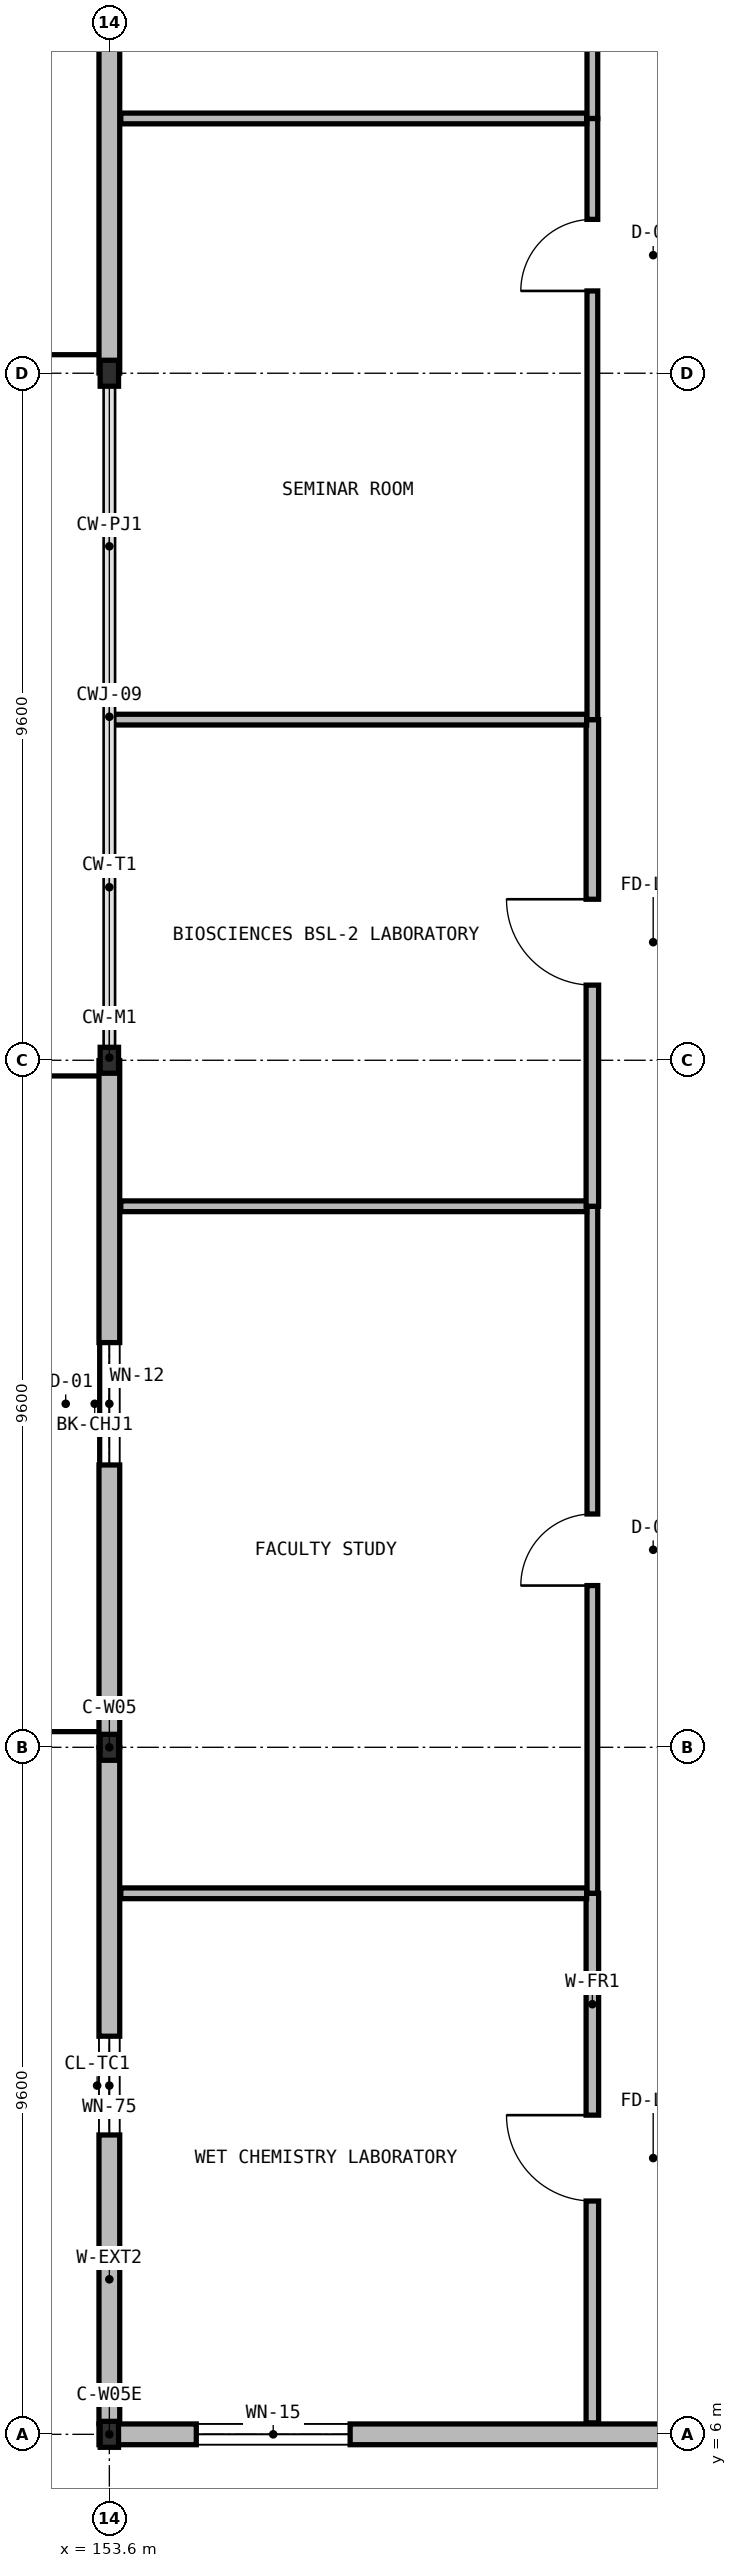
"""IFC4 building model, lengths in metres.
Left out: names, types, materials, properties, quantities, classifications, styles, units other than length and angle.
Written with IfcOpenShell. Run it as: python <this file> out.ifc"""

import sys

from ifc_helpers import new_model, si_unit, direction, frame, frame_2d, origin, origin_2d, place, context, subcontext, project, spatial, rectangle, i_section, extrude, element, fill, save


model = new_model("IFC4")
c1 = context("Model", 3, precision=1e-05, world=origin(), true_north=direction((0.0, 1.0)))
c2 = subcontext(c1, "Body", "Model", "MODEL_VIEW")
j1 = project(units=[si_unit("LENGTHUNIT", "METRE"), si_unit("PLANEANGLEUNIT", "RADIAN")], contexts=[c1])
p1 = place(None, origin())
s1 = spatial("IfcSite", under=j1, at=p1, CompositionType="ELEMENT")
p2 = place(p1, origin())
s2 = spatial("IfcBuilding", under=s1, at=p2, CompositionType="ELEMENT")
p3 = place(p2, frame((0.0, 0.0, 32.55)))
s3 = spatial("IfcBuildingStorey", under=s2, at=p3, CompositionType="ELEMENT", Elevation=32.55)
for number, where, z_axis, x_axis in (
    (1, (153.6, 6.0, 0.0), (0.0, 0.0, 1.0), (1.0, 0.0, 0.0)),
    (2, (153.6, 15.6, 0.0), (0.0, 0.0, 1.0), (1.0, 0.0, 0.0)),
    (3, (153.6, 25.2, 0.0), (0.0, 0.0, 1.0), (1.0, 0.0, 0.0)),
    (4, (153.6, 34.8, 0.0), (0.0, 0.0, 1.0), (1.0, 0.0, 0.0)),
):
    element("IfcColumn", number, at=place(p3, frame(where, z_axis=z_axis, x_axis=x_axis)), inside=s3, PredefinedType="COLUMN", context=c2, shape_type="SweptSolid", body=[
        extrude(i_section(OverallWidth=0.257, OverallDepth=0.363, WebThickness=0.013, FlangeThickness=0.022, at=origin_2d()), origin(), (0.0, 0.0, 1.0), 4.55),
    ])
p4 = place(p3, frame((153.6, 6.149, 0.0), z_axis=(0.0, 0.0, 1.0), x_axis=(0.0, 1.0, 0.0)))
e5 = element("IfcWall", 5, at=p4, inside=s3, PredefinedType="SOLIDWALL", context=c2, shape_type="SweptSolid", body=[
    extrude(rectangle(XDim=9.447, YDim=0.29, at=frame_2d((4.724, 0.0))), origin(), (0.0, 0.0, 1.0), 3.909),
])
p5 = place(p4, frame((4.034, 0.0, 0.95)))
e6 = element("IfcOpeningElement", 6, at=p5, cuts=e5, PredefinedType="OPENING", context=c2, shape_type="SweptSolid", body=[
    extrude(rectangle(XDim=1.38, YDim=1.56, at=frame_2d((0.69, 0.78))), frame((0.0, 0.155, 0.0), z_axis=(0.0, -1.0, 0.0), x_axis=(1.0, 0.0, 0.0)), (0.0, 0.0, 1.0), 0.31),
])
p6 = place(p3, frame((153.6, 15.604, 0.0), z_axis=(0.0, 0.0, 1.0), x_axis=(0.0, 1.0, 0.0)))
e7 = element("IfcWall", 7, at=p6, inside=s3, PredefinedType="SOLIDWALL", context=c2, shape_type="SweptSolid", body=[
    extrude(rectangle(XDim=9.592, YDim=0.29, at=frame_2d((4.796, 0.0))), origin(), (0.0, 0.0, 1.0), 3.909),
])
p7 = place(p6, frame((3.941, 0.0, 0.95)))
e8 = element("IfcOpeningElement", 8, at=p7, cuts=e7, PredefinedType="OPENING", context=c2, shape_type="SweptSolid", body=[
    extrude(rectangle(XDim=1.71, YDim=1.48, at=frame_2d((0.855, 0.74))), frame((0.0, 0.155, 0.0), z_axis=(0.0, -1.0, 0.0), x_axis=(1.0, 0.0, 0.0)), (0.0, 0.0, 1.0), 0.31),
])
p8 = place(p3, frame((153.6, 34.804, 0.0), z_axis=(0.0, 0.0, 1.0), x_axis=(0.0, 1.0, 0.0)))
e9 = element("IfcWall", 9, at=p8, inside=s3, PredefinedType="SOLIDWALL", context=c2, shape_type="SweptSolid", body=[
    extrude(rectangle(XDim=9.592, YDim=0.29, at=frame_2d((4.796, 0.0))), origin(), (0.0, 0.0, 1.0), 3.909),
])
p9 = place(p3, frame((163.196, 6.0, 0.0), z_axis=(0.0, 0.0, 1.0), x_axis=(-1.0, 0.0, 0.0)))
e10 = element("IfcWall", 10, at=p9, inside=s3, PredefinedType="SOLIDWALL", context=c2, shape_type="SweptSolid", body=[
    extrude(rectangle(XDim=9.741, YDim=0.29, at=frame_2d((4.871, 0.0))), origin(), (0.0, 0.0, 1.0), 3.899),
])
p10 = place(p9, frame((6.231, 0.0, 0.95)))
e11 = element("IfcOpeningElement", 11, at=p10, cuts=e10, PredefinedType="OPENING", context=c2, shape_type="SweptSolid", body=[
    extrude(rectangle(XDim=2.15, YDim=1.48, at=frame_2d((1.075, 0.74))), frame((0.0, 0.155, 0.0), z_axis=(0.0, -1.0, 0.0), x_axis=(1.0, 0.0, 0.0)), (0.0, 0.0, 1.0), 0.31),
])
p11 = place(p3, frame((160.35, 6.16, 0.0), z_axis=(0.0, 0.0, 1.0), x_axis=(0.0, 1.0, 0.0)))
e12 = element("IfcWall", 12, at=p11, inside=s3, PredefinedType="PARTITIONING", context=c2, shape_type="SweptSolid", body=[
    extrude(rectangle(XDim=7.4, YDim=0.175, at=frame_2d((3.7, 0.0))), origin(), (0.0, 0.0, 1.0), 4.3),
])
p12 = place(p11, frame((3.1, 0.0, 0.0)))
e13 = element("IfcOpeningElement", 13, at=p12, cuts=e12, PredefinedType="OPENING", context=c2, shape_type="SweptSolid", body=[
    extrude(rectangle(XDim=1.2, YDim=2.2, at=frame_2d((0.6, 1.1))), frame((0.0, 0.097, 0.0), z_axis=(0.0, -1.0, 0.0), x_axis=(1.0, 0.0, 0.0)), (0.0, 0.0, 1.0), 0.195),
])
p13 = place(p3, frame((153.76, 13.56, 0.0), z_axis=(0.0, 0.0, 1.0), x_axis=(1.0, 0.0, 0.0)))
e14 = element("IfcWall", 14, at=p13, inside=s3, PredefinedType="PARTITIONING", context=c2, shape_type="SweptSolid", body=[
    extrude(rectangle(XDim=6.51, YDim=0.15, at=frame_2d((3.255, 0.0))), origin(), (0.0, 0.0, 1.0), 4.3),
])
p14 = place(p3, frame((160.35, 13.56, 0.0), z_axis=(0.0, 0.0, 1.0), x_axis=(0.0, 1.0, 0.0)))
e15 = element("IfcWall", 15, at=p14, inside=s3, PredefinedType="PARTITIONING", context=c2, shape_type="SweptSolid", body=[
    extrude(rectangle(XDim=9.6, YDim=0.15, at=frame_2d((4.8, 0.0))), origin(), (0.0, 0.0, 1.0), 4.3),
])
p15 = place(p14, frame((4.3, 0.0, 0.0)))
e16 = element("IfcOpeningElement", 16, at=p15, cuts=e15, PredefinedType="OPENING", context=c2, shape_type="SweptSolid", body=[
    extrude(rectangle(XDim=1.0, YDim=2.2, at=frame_2d((0.5, 1.1))), frame((0.0, 0.085, 0.0), z_axis=(0.0, -1.0, 0.0), x_axis=(1.0, 0.0, 0.0)), (0.0, 0.0, 1.0), 0.17),
])
p16 = place(p3, frame((153.76, 23.16, 0.0), z_axis=(0.0, 0.0, 1.0), x_axis=(1.0, 0.0, 0.0)))
e17 = element("IfcWall", 17, at=p16, inside=s3, PredefinedType="PARTITIONING", context=c2, shape_type="SweptSolid", body=[
    extrude(rectangle(XDim=6.51, YDim=0.15, at=frame_2d((3.255, 0.0))), origin(), (0.0, 0.0, 1.0), 4.3),
])
p17 = place(p3, frame((160.35, 23.16, 0.0), z_axis=(0.0, 0.0, 1.0), x_axis=(0.0, 1.0, 0.0)))
e18 = element("IfcWall", 18, at=p17, inside=s3, PredefinedType="PARTITIONING", context=c2, shape_type="SweptSolid", body=[
    extrude(rectangle(XDim=6.8, YDim=0.175, at=frame_2d((3.4, 0.0))), origin(), (0.0, 0.0, 1.0), 4.3),
])
p18 = place(p17, frame((3.09, 0.0, 0.0)))
e19 = element("IfcOpeningElement", 19, at=p18, cuts=e18, PredefinedType="OPENING", context=c2, shape_type="SweptSolid", body=[
    extrude(rectangle(XDim=1.2, YDim=2.2, at=frame_2d((0.6, 1.1))), frame((0.0, 0.097, 0.0), z_axis=(0.0, -1.0, 0.0), x_axis=(1.0, 0.0, 0.0)), (0.0, 0.0, 1.0), 0.195),
])
p19 = place(p3, frame((153.66, 29.96, 0.0), z_axis=(0.0, 0.0, 1.0), x_axis=(1.0, 0.0, 0.0)))
e20 = element("IfcWall", 20, at=p19, inside=s3, PredefinedType="PARTITIONING", context=c2, shape_type="SweptSolid", body=[
    extrude(rectangle(XDim=6.61, YDim=0.15, at=frame_2d((3.305, 0.0))), origin(), (0.0, 0.0, 1.0), 4.3),
])
p20 = place(p3, frame((160.35, 29.96, 0.0), z_axis=(0.0, 0.0, 1.0), x_axis=(0.0, 1.0, 0.0)))
e21 = element("IfcWall", 21, at=p20, inside=s3, PredefinedType="PARTITIONING", context=c2, shape_type="SweptSolid", body=[
    extrude(rectangle(XDim=8.4, YDim=0.15, at=frame_2d((4.2, 0.0))), origin(), (0.0, 0.0, 1.0), 4.3),
])
p21 = place(p20, frame((5.99, 0.0, 0.0)))
e22 = element("IfcOpeningElement", 22, at=p21, cuts=e21, PredefinedType="OPENING", context=c2, shape_type="SweptSolid", body=[
    extrude(rectangle(XDim=1.0, YDim=2.2, at=frame_2d((0.5, 1.1))), frame((0.0, 0.085, 0.0), z_axis=(0.0, -1.0, 0.0), x_axis=(1.0, 0.0, 0.0)), (0.0, 0.0, 1.0), 0.17),
])
p22 = place(p3, frame((153.76, 38.36, 0.0), z_axis=(0.0, 0.0, 1.0), x_axis=(1.0, 0.0, 0.0)))
e23 = element("IfcWall", 23, at=p22, inside=s3, PredefinedType="PARTITIONING", context=c2, shape_type="SweptSolid", body=[
    extrude(rectangle(XDim=6.51, YDim=0.15, at=frame_2d((3.255, 0.0))), origin(), (0.0, 0.0, 1.0), 4.3),
])
p23 = place(p3, frame((160.35, 38.36, 0.0), z_axis=(0.0, 0.0, 1.0), x_axis=(0.0, 1.0, 0.0)))
e24 = element("IfcWall", 24, at=p23, inside=s3, PredefinedType="PARTITIONING", context=c2, shape_type="SweptSolid", body=[
    extrude(rectangle(XDim=7.4, YDim=0.15, at=frame_2d((3.7, 0.0))), origin(), (0.0, 0.0, 1.0), 4.3),
])
p24 = place(p23, frame((3.2, 0.0, 0.0)))
e25 = element("IfcOpeningElement", 25, at=p24, cuts=e24, PredefinedType="OPENING", context=c2, shape_type="SweptSolid", body=[
    extrude(rectangle(XDim=1.0, YDim=2.2, at=frame_2d((0.5, 1.1))), frame((0.0, 0.085, 0.0), z_axis=(0.0, -1.0, 0.0), x_axis=(1.0, 0.0, 0.0)), (0.0, 0.0, 1.0), 0.17),
])
p25 = place(p5, origin())
e26 = element("IfcWindow", 26, at=p25, inside=s3, PartitioningType="SINGLE_PANEL", PredefinedType="WINDOW", context=c2, shape_type="SweptSolid", body=[
    extrude(rectangle(XDim=1.38, YDim=1.56, at=frame_2d((0.69, 0.78))), frame((0.0, 0.03, 0.0), z_axis=(0.0, -1.0, 0.0), x_axis=(1.0, 0.0, 0.0)), (0.0, 0.0, 1.0), 0.06),
])
fill(e6, e26)
p26 = place(p7, origin())
e27 = element("IfcWindow", 27, at=p26, inside=s3, PartitioningType="SINGLE_PANEL", PredefinedType="WINDOW", context=c2, shape_type="SweptSolid", body=[
    extrude(rectangle(XDim=1.71, YDim=1.48, at=frame_2d((0.855, 0.74))), frame((0.0, 0.03, 0.0), z_axis=(0.0, -1.0, 0.0), x_axis=(1.0, 0.0, 0.0)), (0.0, 0.0, 1.0), 0.06),
])
fill(e8, e27)
p27 = place(p10, origin())
e28 = element("IfcWindow", 28, at=p27, inside=s3, PartitioningType="SINGLE_PANEL", PredefinedType="WINDOW", context=c2, shape_type="SweptSolid", body=[
    extrude(rectangle(XDim=2.15, YDim=1.48, at=frame_2d((1.075, 0.74))), frame((0.0, 0.03, 0.0), z_axis=(0.0, -1.0, 0.0), x_axis=(1.0, 0.0, 0.0)), (0.0, 0.0, 1.0), 0.06),
])
fill(e11, e28)
p28 = place(p12, origin())
e29 = element("IfcDoor", 29, at=p28, inside=s3, OperationType="SINGLE_SWING_RIGHT", PredefinedType="DOOR", context=c2, shape_type="SweptSolid", body=[
    extrude(rectangle(XDim=1.2, YDim=2.2, at=frame_2d((0.6, 1.1))), frame((0.0, 0.025, 0.0), z_axis=(0.0, -1.0, 0.0), x_axis=(1.0, 0.0, 0.0)), (0.0, 0.0, 1.0), 0.05),
])
fill(e13, e29)
p29 = place(p15, origin())
e30 = element("IfcDoor", 30, at=p29, inside=s3, OperationType="SINGLE_SWING_LEFT", PredefinedType="DOOR", context=c2, shape_type="SweptSolid", body=[
    extrude(rectangle(XDim=1.0, YDim=2.2, at=frame_2d((0.5, 1.1))), frame((0.0, 0.025, 0.0), z_axis=(0.0, -1.0, 0.0), x_axis=(1.0, 0.0, 0.0)), (0.0, 0.0, 1.0), 0.05),
])
fill(e16, e30)
p30 = place(p18, origin())
e31 = element("IfcDoor", 31, at=p30, inside=s3, OperationType="SINGLE_SWING_RIGHT", PredefinedType="DOOR", context=c2, shape_type="SweptSolid", body=[
    extrude(rectangle(XDim=1.2, YDim=2.2, at=frame_2d((0.6, 1.1))), frame((0.0, 0.025, 0.0), z_axis=(0.0, -1.0, 0.0), x_axis=(1.0, 0.0, 0.0)), (0.0, 0.0, 1.0), 0.05),
])
fill(e19, e31)
p31 = place(p21, origin())
e32 = element("IfcDoor", 32, at=p31, inside=s3, OperationType="SINGLE_SWING_LEFT", PredefinedType="DOOR", context=c2, shape_type="SweptSolid", body=[
    extrude(rectangle(XDim=1.0, YDim=2.2, at=frame_2d((0.5, 1.1))), frame((0.0, 0.025, 0.0), z_axis=(0.0, -1.0, 0.0), x_axis=(1.0, 0.0, 0.0)), (0.0, 0.0, 1.0), 0.05),
])
fill(e22, e32)
save(model, sys.argv[1])
